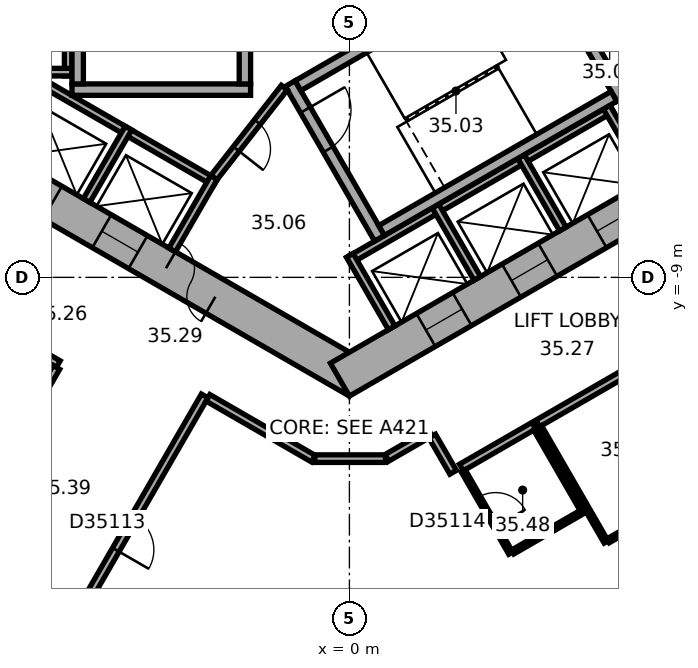
"""IFC4 building model, lengths in metres.
Left out: names, types, materials, properties, quantities, classifications, styles, units other than length and angle.
Written with IfcOpenShell. Run it as: python <this file> out.ifc"""

import sys

from ifc_helpers import new_model, si_unit, direction, frame, frame_2d, origin, place, context, subcontext, project, spatial, rectangle, extrude, element, fill, save


model = new_model("IFC4")
c1 = context("Model", 3, precision=1e-05, world=origin(), true_north=direction((0.0, 1.0)))
c2 = subcontext(c1, "Body", "Model", "MODEL_VIEW")
j1 = project(units=[si_unit("LENGTHUNIT", "METRE"), si_unit("PLANEANGLEUNIT", "RADIAN")], contexts=[c1])
p1 = place(None, origin())
s1 = spatial("IfcSite", under=j1, at=p1, CompositionType="ELEMENT")
p2 = place(p1, origin())
s2 = spatial("IfcBuilding", under=s1, at=p2, CompositionType="ELEMENT")
p3 = place(p2, frame((0.0, 0.0, 146.6)))
s3 = spatial("IfcBuildingStorey", under=s2, at=p3, CompositionType="ELEMENT", Elevation=146.6)
p4 = place(p3, frame((-10.25, -5.629, 0.0), z_axis=(0.0, 0.0, 1.0), x_axis=(0.866022616891, -0.50000482701, 0.0)))
e1 = element("IfcWall", 1, at=p4, inside=s3, PredefinedType="SHEAR", context=c2, shape_type="SweptSolid", body=[
    extrude(rectangle(XDim=12.125, YDim=1.0, at=frame_2d((6.062, 0.0))), origin(), (0.0, 0.0, 1.0), 3.7),
])
p5 = place(p4, frame((6.262, 0.0, 0.0)))
e2 = element("IfcOpeningElement", 2, at=p5, cuts=e1, PredefinedType="OPENING", context=c2, shape_type="SweptSolid", body=[
    extrude(rectangle(XDim=1.5, YDim=2.1, at=frame_2d((0.75, 1.05))), frame((0.0, 0.51, 0.0), z_axis=(0.0, -1.0, 0.0), x_axis=(1.0, 0.0, 0.0)), (0.0, 0.0, 1.0), 1.02),
])
p6 = place(p4, frame((1.712, 0.0, 0.0)))
e3 = element("IfcOpeningElement", 3, at=p6, cuts=e1, PredefinedType="OPENING", context=c2, shape_type="SweptSolid", body=[
    extrude(rectangle(XDim=1.1, YDim=2.1, at=frame_2d((0.55, 1.05))), frame((0.0, 0.51, 0.0), z_axis=(0.0, -1.0, 0.0), x_axis=(1.0, 0.0, 0.0)), (0.0, 0.0, 1.0), 1.02),
])
p7 = place(p4, frame((4.312, 0.0, 0.0)))
e4 = element("IfcOpeningElement", 4, at=p7, cuts=e1, PredefinedType="OPENING", context=c2, shape_type="SweptSolid", body=[
    extrude(rectangle(XDim=1.1, YDim=2.1, at=frame_2d((0.55, 1.05))), frame((0.0, 0.51, 0.0), z_axis=(0.0, -1.0, 0.0), x_axis=(1.0, 0.0, 0.0)), (0.0, 0.0, 1.0), 1.02),
])
p8 = place(p3, frame((-0.25, -11.691, 0.0), z_axis=(0.0, 0.0, 1.0), x_axis=(0.866022616891, 0.50000482701, 0.0)))
e5 = element("IfcWall", 5, at=p8, inside=s3, PredefinedType="SHEAR", context=c2, shape_type="SweptSolid", body=[
    extrude(rectangle(XDim=12.125, YDim=1.0, at=frame_2d((6.062, 0.0))), origin(), (0.0, 0.0, 1.0), 3.7),
])
p9 = place(p8, frame((2.612, 0.0, 0.0)))
e6 = element("IfcOpeningElement", 6, at=p9, cuts=e5, PredefinedType="OPENING", context=c2, shape_type="SweptSolid", body=[
    extrude(rectangle(XDim=1.1, YDim=2.1, at=frame_2d((0.55, 1.05))), frame((0.0, 0.51, 0.0), z_axis=(0.0, -1.0, 0.0), x_axis=(1.0, 0.0, 0.0)), (0.0, 0.0, 1.0), 1.02),
])
p10 = place(p8, frame((5.212, 0.0, 0.0)))
e7 = element("IfcOpeningElement", 7, at=p10, cuts=e5, PredefinedType="OPENING", context=c2, shape_type="SweptSolid", body=[
    extrude(rectangle(XDim=1.1, YDim=2.1, at=frame_2d((0.55, 1.05))), frame((0.0, 0.51, 0.0), z_axis=(0.0, -1.0, 0.0), x_axis=(1.0, 0.0, 0.0)), (0.0, 0.0, 1.0), 1.02),
])
p11 = place(p8, frame((7.812, 0.0, 0.0)))
e8 = element("IfcOpeningElement", 8, at=p11, cuts=e5, PredefinedType="OPENING", context=c2, shape_type="SweptSolid", body=[
    extrude(rectangle(XDim=1.1, YDim=2.1, at=frame_2d((0.55, 1.05))), frame((0.0, 0.51, 0.0), z_axis=(0.0, -1.0, 0.0), x_axis=(1.0, 0.0, 0.0)), (0.0, 0.0, 1.0), 1.02),
])
p12 = place(p3, frame((-18.789, -14.267, 0.0), z_axis=(0.0, 0.0, 1.0), x_axis=(0.866023315909, -0.500003616288, 0.0)))
e9 = element("IfcWall", 9, at=p12, inside=s3, PredefinedType="STANDARD", context=c2, shape_type="SweptSolid", body=[
    extrude(rectangle(XDim=20.044, YDim=0.2, at=frame_2d((10.022, 0.0))), origin(), (0.0, 0.0, 1.0), 3.7),
])
p13 = place(p12, frame((1.314, 0.0, 0.9)))
e10 = element("IfcOpeningElement", 10, at=p13, cuts=e9, PredefinedType="OPENING", context=c2, shape_type="SweptSolid", body=[
    extrude(rectangle(XDim=2.4, YDim=2.0, at=frame_2d((1.2, 1.0))), frame((0.0, 0.11, 0.0), z_axis=(0.0, -1.0, 0.0), x_axis=(1.0, 0.0, 0.0)), (0.0, 0.0, 1.0), 0.22),
])
p14 = place(p12, frame((5.069, 0.0, 0.9)))
e11 = element("IfcOpeningElement", 11, at=p14, cuts=e9, PredefinedType="OPENING", context=c2, shape_type="SweptSolid", body=[
    extrude(rectangle(XDim=2.4, YDim=2.0, at=frame_2d((1.2, 1.0))), frame((0.0, 0.11, 0.0), z_axis=(0.0, -1.0, 0.0), x_axis=(1.0, 0.0, 0.0)), (0.0, 0.0, 1.0), 0.22),
])
p15 = place(p12, frame((8.823, 0.0, 0.9)))
e12 = element("IfcOpeningElement", 12, at=p15, cuts=e9, PredefinedType="OPENING", context=c2, shape_type="SweptSolid", body=[
    extrude(rectangle(XDim=2.4, YDim=2.0, at=frame_2d((1.2, 1.0))), frame((0.0, 0.11, 0.0), z_axis=(0.0, -1.0, 0.0), x_axis=(1.0, 0.0, 0.0)), (0.0, 0.0, 1.0), 0.22),
])
p16 = place(p12, frame((12.577, 0.0, 0.9)))
e13 = element("IfcOpeningElement", 13, at=p16, cuts=e9, PredefinedType="OPENING", context=c2, shape_type="SweptSolid", body=[
    extrude(rectangle(XDim=2.4, YDim=2.0, at=frame_2d((1.2, 1.0))), frame((0.0, 0.11, 0.0), z_axis=(0.0, -1.0, 0.0), x_axis=(1.0, 0.0, 0.0)), (0.0, 0.0, 1.0), 0.22),
])
p17 = place(p12, frame((16.331, 0.0, 0.9)))
e14 = element("IfcOpeningElement", 14, at=p17, cuts=e9, PredefinedType="OPENING", context=c2, shape_type="SweptSolid", body=[
    extrude(rectangle(XDim=2.4, YDim=2.0, at=frame_2d((1.2, 1.0))), frame((0.0, 0.11, 0.0), z_axis=(0.0, -1.0, 0.0), x_axis=(1.0, 0.0, 0.0)), (0.0, 0.0, 1.0), 0.22),
])
p18 = place(p3, frame((2.911, -24.156, 0.0), z_axis=(0.0, 0.0, 1.0), x_axis=(0.833882163564, 0.551942512668, 0.0)))
e15 = element("IfcWall", 15, at=p18, inside=s3, PredefinedType="STANDARD", context=c2, shape_type="SweptSolid", body=[
    extrude(rectangle(XDim=20.044, YDim=0.2, at=frame_2d((10.022, 0.0))), origin(), (0.0, 0.0, 1.0), 3.7),
])
p19 = place(p18, frame((1.313, 0.0, 0.9)))
e16 = element("IfcOpeningElement", 16, at=p19, cuts=e15, PredefinedType="OPENING", context=c2, shape_type="SweptSolid", body=[
    extrude(rectangle(XDim=2.4, YDim=2.0, at=frame_2d((1.2, 1.0))), frame((0.0, 0.11, 0.0), z_axis=(0.0, -1.0, 0.0), x_axis=(1.0, 0.0, 0.0)), (0.0, 0.0, 1.0), 0.22),
])
p20 = place(p18, frame((5.067, 0.0, 0.9)))
e17 = element("IfcOpeningElement", 17, at=p20, cuts=e15, PredefinedType="OPENING", context=c2, shape_type="SweptSolid", body=[
    extrude(rectangle(XDim=2.4, YDim=2.0, at=frame_2d((1.2, 1.0))), frame((0.0, 0.11, 0.0), z_axis=(0.0, -1.0, 0.0), x_axis=(1.0, 0.0, 0.0)), (0.0, 0.0, 1.0), 0.22),
])
p21 = place(p18, frame((8.821, 0.0, 0.9)))
e18 = element("IfcOpeningElement", 18, at=p21, cuts=e15, PredefinedType="OPENING", context=c2, shape_type="SweptSolid", body=[
    extrude(rectangle(XDim=2.4, YDim=2.0, at=frame_2d((1.2, 1.0))), frame((0.0, 0.11, 0.0), z_axis=(0.0, -1.0, 0.0), x_axis=(1.0, 0.0, 0.0)), (0.0, 0.0, 1.0), 0.22),
])
p22 = place(p18, frame((12.575, 0.0, 0.9)))
e19 = element("IfcOpeningElement", 19, at=p22, cuts=e15, PredefinedType="OPENING", context=c2, shape_type="SweptSolid", body=[
    extrude(rectangle(XDim=2.4, YDim=2.0, at=frame_2d((1.2, 1.0))), frame((0.0, 0.11, 0.0), z_axis=(0.0, -1.0, 0.0), x_axis=(1.0, 0.0, 0.0)), (0.0, 0.0, 1.0), 0.22),
])
p23 = place(p18, frame((16.329, 0.0, 0.9)))
e20 = element("IfcOpeningElement", 20, at=p23, cuts=e15, PredefinedType="OPENING", context=c2, shape_type="SweptSolid", body=[
    extrude(rectangle(XDim=2.4, YDim=2.0, at=frame_2d((1.2, 1.0))), frame((0.0, 0.11, 0.0), z_axis=(0.0, -1.0, 0.0), x_axis=(1.0, 0.0, 0.0)), (0.0, 0.0, 1.0), 0.22),
])
p24 = place(p3, frame((-7.4, 4.3, 0.0), z_axis=(0.0, 0.0, 1.0), x_axis=(0.0, -1.0, 0.0)))
e21 = element("IfcWall", 21, at=p24, inside=s3, PredefinedType="PARTITIONING", context=c2, shape_type="SweptSolid", body=[
    extrude(rectangle(XDim=8.0, YDim=0.2, at=frame_2d((4.0, 0.0))), origin(), (0.0, 0.0, 1.0), 3.42),
])
p25 = place(p3, frame((-7.3, -3.6, 0.0), z_axis=(0.0, 0.0, 1.0), x_axis=(-1.0, 0.0, 0.0)))
e22 = element("IfcWall", 22, at=p25, inside=s3, PredefinedType="PARTITIONING", context=c2, shape_type="SweptSolid", body=[
    extrude(rectangle(XDim=2.2, YDim=0.2, at=frame_2d((1.1, 0.0))), origin(), (0.0, 0.0, 1.0), 3.42),
])
p26 = place(p3, frame((-8.203, -3.809, 0.0), z_axis=(0.0, 0.0, 1.0), x_axis=(0.866028230842, -0.499995103361, 0.0)))
e23 = element("IfcWall", 23, at=p26, inside=s3, PredefinedType="PARTITIONING", context=c2, shape_type="SweptSolid", body=[
    extrude(rectangle(XDim=5.4, YDim=0.2, at=frame_2d((2.7, 0.0))), origin(), (0.0, 0.0, 1.0), 3.42),
])
p27 = place(p3, frame((-5.815, -5.072, 0.0), z_axis=(0.0, 0.0, 1.0), x_axis=(-0.499946605688, -0.86605622881, 0.0)))
e24 = element("IfcWall", 24, at=p27, inside=s3, PredefinedType="PARTITIONING", context=c2, shape_type="SweptSolid", body=[
    extrude(rectangle(XDim=2.2, YDim=0.2, at=frame_2d((1.1, 0.0))), origin(), (0.0, 0.0, 1.0), 3.42),
])
p28 = place(p3, frame((-3.563, -6.372, 0.0), z_axis=(0.0, 0.0, 1.0), x_axis=(-0.499994660107, -0.866028486751, 0.0)))
e25 = element("IfcWall", 25, at=p28, inside=s3, PredefinedType="PARTITIONING", context=c2, shape_type="SweptSolid", body=[
    extrude(rectangle(XDim=2.2, YDim=0.2, at=frame_2d((1.1, 0.0))), origin(), (0.0, 0.0, 1.0), 3.42),
])
p29 = place(p3, frame((-0.024, -8.559, 0.0), z_axis=(0.0, 0.0, 1.0), x_axis=(0.866026010844, 0.49999894854, 0.0)))
e26 = element("IfcWall", 26, at=p29, inside=s3, PredefinedType="PARTITIONING", context=c2, shape_type="SweptSolid", body=[
    extrude(rectangle(XDim=8.0, YDim=0.2, at=frame_2d((4.0, 0.0))), origin(), (0.0, 0.0, 1.0), 3.42),
])
for number, where, z_axis, x_axis in (
    (27, (0.013, -8.422, 0.0), (0.0, 0.0, 1.0), (0.5, -0.866, 0.0)),
    (28, (2.264, -7.122, 0.0), (0.0, 0.0, 1.0), (0.5, -0.866, 0.0)),
    (29, (4.516, -5.822, 0.0), (0.0, 0.0, 1.0), (0.5, -0.866, 0.0)),
    (30, (6.768, -4.522, 0.0), (0.0, 0.0, 1.0), (0.5, -0.866, 0.0)),
):
    element("IfcWall", number, at=place(p3, frame(where, z_axis=z_axis, x_axis=x_axis)), inside=s3, PredefinedType="PARTITIONING", context=c2, shape_type="SweptSolid", body=[
        extrude(rectangle(XDim=2.2, YDim=0.2, at=frame_2d((1.1, 0.0))), origin(), (0.0, 0.0, 1.0), 3.42),
    ])
p30 = place(p3, frame((-2.6, -4.06, 0.0), z_axis=(0.0, 0.0, 1.0), x_axis=(-1.0, 0.0, 0.0)))
e31 = element("IfcWall", 31, at=p30, inside=s3, PredefinedType="SHEAR", context=c2, shape_type="SweptSolid", body=[
    extrude(rectangle(XDim=4.7, YDim=0.3, at=frame_2d((2.35, 0.0))), origin(), (0.0, 0.0, 1.0), 3.42),
])
for number, where, z_axis, x_axis in (
    (32, (-2.75, 3.15, 0.0), (0.0, 0.0, 1.0), (0.0, -1.0, 0.0)),
    (33, (-7.15, 3.15, 0.0), (0.0, 0.0, 1.0), (0.0, -1.0, 0.0)),
):
    element("IfcWall", number, at=place(p3, frame(where, z_axis=z_axis, x_axis=x_axis)), inside=s3, PredefinedType="SHEAR", context=c2, shape_type="SweptSolid", body=[
        extrude(rectangle(XDim=7.06, YDim=0.3, at=frame_2d((3.53, 0.0))), origin(), (0.0, 0.0, 1.0), 3.42),
    ])
p31 = place(p3, frame((-1.558, -3.902, 0.0), z_axis=(0.0, 0.0, 1.0), x_axis=(0.499977259774, -0.866038532462, 0.0)))
e34 = element("IfcWall", 34, at=p31, inside=s3, PredefinedType="SHEAR", context=c2, shape_type="SweptSolid", body=[
    extrude(rectangle(XDim=4.7, YDim=0.3, at=frame_2d((2.35, 0.0))), origin(), (0.0, 0.0, 1.0), 3.42),
])
p32 = place(p31, frame((0.8, 0.0, 0.0)))
e35 = element("IfcOpeningElement", 35, at=p32, cuts=e34, PredefinedType="OPENING", context=c2, shape_type="SweptSolid", body=[
    extrude(rectangle(XDim=1.2, YDim=2.1, at=frame_2d((0.6, 1.05))), frame((0.0, 0.16, 0.0), z_axis=(0.0, -1.0, 0.0), x_axis=(1.0, 0.0, 0.0)), (0.0, 0.0, 1.0), 0.32),
])
p33 = place(p3, frame((4.816, -0.222, 0.0), z_axis=(0.0, 0.0, 1.0), x_axis=(0.499977259774, -0.866038532462, 0.0)))
e36 = element("IfcWall", 36, at=p33, inside=s3, PredefinedType="SHEAR", context=c2, shape_type="SweptSolid", body=[
    extrude(rectangle(XDim=4.7, YDim=0.3, at=frame_2d((2.35, 0.0))), origin(), (0.0, 0.0, 1.0), 3.42),
])
for number, where, z_axis, x_axis in (
    (37, (-1.353, -3.957, 0.0), (0.0, 0.0, 1.0), (0.866, 0.5, 0.0)),
    (38, (0.847, -7.767, 0.0), (0.0, 0.0, 1.0), (0.866, 0.5, 0.0)),
):
    element("IfcWall", number, at=place(p3, frame(where, z_axis=z_axis, x_axis=x_axis)), inside=s3, PredefinedType="SHEAR", context=c2, shape_type="SweptSolid", body=[
        extrude(rectangle(XDim=7.06, YDim=0.3, at=frame_2d((3.53, 0.0))), origin(), (0.0, 0.0, 1.0), 3.42),
    ])
p34 = place(p3, frame((-1.712, -4.008, 0.0), z_axis=(0.0, 0.0, 1.0), x_axis=(-0.616549420702, -0.787316208287, 0.0)))
e39 = element("IfcWall", 39, at=p34, inside=s3, PredefinedType="PARTITIONING", context=c2, shape_type="SweptSolid", body=[
    extrude(rectangle(XDim=3.002, YDim=0.2, at=frame_2d((1.501, 0.0))), origin(), (0.0, 0.0, 1.0), 3.42),
])
p35 = place(p34, frame((1.15, 0.0, 0.0)))
e40 = element("IfcOpeningElement", 40, at=p35, cuts=e39, PredefinedType="OPENING", context=c2, shape_type="SweptSolid", body=[
    extrude(rectangle(XDim=0.9, YDim=2.1, at=frame_2d((0.45, 1.05))), frame((0.0, 0.11, 0.0), z_axis=(0.0, -1.0, 0.0), x_axis=(1.0, 0.0, 0.0)), (0.0, 0.0, 1.0), 0.22),
])
p36 = place(p3, frame((-11.435, -9.103, 0.0), z_axis=(0.0, 0.0, 1.0), x_axis=(0.866007399799, -0.500031182522, 0.0)))
e41 = element("IfcWall", 41, at=p36, inside=s3, PredefinedType="PARTITIONING", context=c2, shape_type="SweptSolid", body=[
    extrude(rectangle(XDim=4.358, YDim=0.2, at=frame_2d((2.179, 0.0))), origin(), (0.0, 0.0, 1.0), 3.42),
])
p37 = place(p3, frame((-11.235, -17.474, 0.0), z_axis=(0.0, 0.0, 1.0), x_axis=(0.500009260695, 0.866020057054, 0.0)))
e42 = element("IfcWall", 42, at=p37, inside=s3, PredefinedType="PARTITIONING", context=c2, shape_type="SweptSolid", body=[
    extrude(rectangle(XDim=7.049, YDim=0.2, at=frame_2d((3.524, 0.0))), origin(), (0.0, 0.0, 1.0), 2.87),
])
p38 = place(p37, frame((3.024, 0.0, 0.0)))
e43 = element("IfcOpeningElement", 43, at=p38, cuts=e42, PredefinedType="OPENING", context=c2, shape_type="SweptSolid", body=[
    extrude(rectangle(XDim=1.0, YDim=2.1, at=frame_2d((0.5, 1.05))), frame((0.0, 0.11, 0.0), z_axis=(0.0, -1.0, 0.0), x_axis=(1.0, 0.0, 0.0)), (0.0, 0.0, 1.0), 0.22),
])
p39 = place(p3, frame((-7.984, -19.351, 0.0), z_axis=(0.0, 0.0, 1.0), x_axis=(0.500010139422, 0.866019549707, 0.0)))
e44 = element("IfcWall", 44, at=p39, inside=s3, PredefinedType="PARTITIONING", context=c2, shape_type="SweptSolid", body=[
    extrude(rectangle(XDim=8.35, YDim=0.2, at=frame_2d((4.175, 0.0))), origin(), (0.0, 0.0, 1.0), 3.42),
])
p40 = place(p39, frame((3.675, 0.0, 0.0)))
e45 = element("IfcOpeningElement", 45, at=p40, cuts=e44, PredefinedType="OPENING", context=c2, shape_type="SweptSolid", body=[
    extrude(rectangle(XDim=1.0, YDim=2.1, at=frame_2d((0.5, 1.05))), frame((0.0, 0.11, 0.0), z_axis=(0.0, -1.0, 0.0), x_axis=(1.0, 0.0, 0.0)), (0.0, 0.0, 1.0), 0.22),
])
p41 = place(p3, frame((-3.722, -12.169, 0.0), z_axis=(0.0, 0.0, 1.0), x_axis=(0.866033163891, -0.499986558861, 0.0)))
e46 = element("IfcWall", 46, at=p41, inside=s3, PredefinedType="PARTITIONING", context=c2, shape_type="SweptSolid", body=[
    extrude(rectangle(XDim=3.201, YDim=0.2, at=frame_2d((1.6, 0.0))), origin(), (0.0, 0.0, 1.0), 3.42),
])
p42 = place(p3, frame((-0.91, -13.77, 0.0), z_axis=(0.0, 0.0, 1.0), x_axis=(1.0, 0.0, 0.0)))
e47 = element("IfcWall", 47, at=p42, inside=s3, PredefinedType="PARTITIONING", context=c2, shape_type="SweptSolid", body=[
    extrude(rectangle(XDim=1.86, YDim=0.2, at=frame_2d((0.93, 0.0))), origin(), (0.0, 0.0, 1.0), 3.42),
])
p43 = place(p3, frame((0.985, -13.75, 0.0), z_axis=(0.0, 0.0, 1.0), x_axis=(0.866028661061, 0.499994358189, 0.0)))
e48 = element("IfcWall", 48, at=p43, inside=s3, PredefinedType="PARTITIONING", context=c2, shape_type="SweptSolid", body=[
    extrude(rectangle(XDim=1.321, YDim=0.2, at=frame_2d((0.661, 0.0))), origin(), (0.0, 0.0, 1.0), 3.42),
])
p44 = place(p3, frame((2.179, -13.176, 0.0), z_axis=(0.0, 0.0, 1.0), x_axis=(0.499978356969, -0.866037899034, 0.0)))
e49 = element("IfcWall", 49, at=p44, inside=s3, PredefinedType="PARTITIONING", context=c2, shape_type="SweptSolid", body=[
    extrude(rectangle(XDim=1.101, YDim=0.2, at=frame_2d((0.551, 0.0))), origin(), (0.0, 0.0, 1.0), 3.42),
])
p45 = place(p3, frame((2.946, -14.004, 0.0), z_axis=(0.0, 0.0, 1.0), x_axis=(0.866008176907, 0.50002983664, 0.0)))
e50 = element("IfcWall", 50, at=p45, inside=s3, PredefinedType="PARTITIONING", context=c2, shape_type="SweptSolid", body=[
    extrude(rectangle(XDim=2.2, YDim=0.2, at=frame_2d((1.1, 0.0))), origin(), (0.0, 0.0, 1.0), 3.42),
])
p46 = place(p3, frame((4.246, -16.256, 0.0), z_axis=(0.0, 0.0, 1.0), x_axis=(-0.499961950354, 0.866047370643, 0.0)))
e51 = element("IfcWall", 51, at=p46, inside=s3, PredefinedType="PARTITIONING", context=c2, shape_type="SweptSolid", body=[
    extrude(rectangle(XDim=2.5, YDim=0.12, at=frame_2d((1.25, 0.0))), origin(), (0.0, 0.0, 1.0), 3.42),
])
p47 = place(p46, frame((0.8, 0.0, 0.0)))
e52 = element("IfcOpeningElement", 52, at=p47, cuts=e51, PredefinedType="OPENING", context=c2, shape_type="SweptSolid", body=[
    extrude(rectangle(XDim=0.9, YDim=2.1, at=frame_2d((0.45, 1.05))), frame((0.0, 0.07, 0.0), z_axis=(0.0, -1.0, 0.0), x_axis=(1.0, 0.0, 0.0)), (0.0, 0.0, 1.0), 0.14),
])
p48 = place(p3, frame((4.901, -12.991, 0.0), z_axis=(0.0, 0.0, 1.0), x_axis=(0.500004234368, -0.866022959057, 0.0)))
e53 = element("IfcWall", 53, at=p48, inside=s3, PredefinedType="PARTITIONING", context=c2, shape_type="SweptSolid", body=[
    extrude(rectangle(XDim=2.5, YDim=0.12, at=frame_2d((1.25, 0.0))), origin(), (0.0, 0.0, 1.0), 3.42),
])
p49 = place(p3, frame((4.955, -12.844, 0.0), z_axis=(0.0, 0.0, 1.0), x_axis=(0.86602379309, 0.500002789795, 0.0)))
e54 = element("IfcWall", 54, at=p49, inside=s3, PredefinedType="PARTITIONING", context=c2, shape_type="SweptSolid", body=[
    extrude(rectangle(XDim=6.232, YDim=0.2, at=frame_2d((3.116, 0.0))), origin(), (0.0, 0.0, 1.0), 3.42),
])
p50 = place(p3, frame((6.099, -15.186, 0.0), z_axis=(0.0, 0.0, 1.0), x_axis=(-0.866009661879, -0.500027264788, 0.0)))
e55 = element("IfcWall", 55, at=p50, inside=s3, PredefinedType="PARTITIONING", context=c2, shape_type="SweptSolid", body=[
    extrude(rectangle(XDim=2.08, YDim=0.12, at=frame_2d((1.04, 0.0))), origin(), (0.0, 0.0, 1.0), 3.42),
])
p51 = place(p3, frame((6.755, -15.962, 0.0), z_axis=(0.0, 0.0, 1.0), x_axis=(-0.500010275428, 0.866019471182, 0.0)))
e56 = element("IfcWall", 56, at=p51, inside=s3, PredefinedType="PARTITIONING", context=c2, shape_type="SweptSolid", body=[
    extrude(rectangle(XDim=3.5, YDim=0.12, at=frame_2d((1.75, 0.0))), origin(), (0.0, 0.0, 1.0), 3.42),
])
p52 = place(p3, frame((9.647, -14.292, 0.0), z_axis=(0.0, 0.0, 1.0), x_axis=(-0.866040564224, -0.499973740429, 0.0)))
e57 = element("IfcWall", 57, at=p52, inside=s3, PredefinedType="PARTITIONING", context=c2, shape_type="SweptSolid", body=[
    extrude(rectangle(XDim=3.28, YDim=0.12, at=frame_2d((1.64, 0.0))), origin(), (0.0, 0.0, 1.0), 3.42),
])
p53 = place(p52, frame((1.19, 0.0, 0.0)))
e58 = element("IfcOpeningElement", 58, at=p53, cuts=e57, PredefinedType="OPENING", context=c2, shape_type="SweptSolid", body=[
    extrude(rectangle(XDim=0.9, YDim=2.1, at=frame_2d((0.45, 1.05))), frame((0.0, 0.07, 0.0), z_axis=(0.0, -1.0, 0.0), x_axis=(1.0, 0.0, 0.0)), (0.0, 0.0, 1.0), 0.14),
])
p54 = place(p5, origin())
e59 = element("IfcDoor", 59, at=p54, inside=s3, OperationType="DOUBLE_DOOR_SINGLE_SWING", PredefinedType="DOOR", context=c2, shape_type="SweptSolid", body=[
    extrude(rectangle(XDim=1.5, YDim=2.1, at=frame_2d((0.75, 1.05))), frame((0.0, 0.025, 0.0), z_axis=(0.0, -1.0, 0.0), x_axis=(1.0, 0.0, 0.0)), (0.0, 0.0, 1.0), 0.05),
])
fill(e2, e59)
p55 = place(p32, origin())
e60 = element("IfcDoor", 60, at=p55, inside=s3, OperationType="SINGLE_SWING_RIGHT", PredefinedType="DOOR", context=c2, shape_type="SweptSolid", body=[
    extrude(rectangle(XDim=1.2, YDim=2.1, at=frame_2d((0.6, 1.05))), frame((0.0, 0.025, 0.0), z_axis=(0.0, -1.0, 0.0), x_axis=(1.0, 0.0, 0.0)), (0.0, 0.0, 1.0), 0.05),
])
fill(e35, e60)
p56 = place(p35, origin())
e61 = element("IfcDoor", 61, at=p56, inside=s3, OperationType="SINGLE_SWING_LEFT", PredefinedType="DOOR", context=c2, shape_type="SweptSolid", body=[
    extrude(rectangle(XDim=0.9, YDim=2.1, at=frame_2d((0.45, 1.05))), frame((0.0, 0.025, 0.0), z_axis=(0.0, -1.0, 0.0), x_axis=(1.0, 0.0, 0.0)), (0.0, 0.0, 1.0), 0.05),
])
fill(e40, e61)
p57 = place(p6, origin())
e62 = element("IfcDoor", 62, at=p57, inside=s3, OperationType="DOUBLE_DOOR_SLIDING", PredefinedType="DOOR", context=c2, shape_type="SweptSolid", body=[
    extrude(rectangle(XDim=1.1, YDim=2.1, at=frame_2d((0.55, 1.05))), frame((0.0, 0.025, 0.0), z_axis=(0.0, -1.0, 0.0), x_axis=(1.0, 0.0, 0.0)), (0.0, 0.0, 1.0), 0.05),
])
fill(e3, e62)
p58 = place(p7, origin())
e63 = element("IfcDoor", 63, at=p58, inside=s3, OperationType="DOUBLE_DOOR_SLIDING", PredefinedType="DOOR", context=c2, shape_type="SweptSolid", body=[
    extrude(rectangle(XDim=1.1, YDim=2.1, at=frame_2d((0.55, 1.05))), frame((0.0, 0.025, 0.0), z_axis=(0.0, -1.0, 0.0), x_axis=(1.0, 0.0, 0.0)), (0.0, 0.0, 1.0), 0.05),
])
fill(e4, e63)
p59 = place(p9, origin())
e64 = element("IfcDoor", 64, at=p59, inside=s3, OperationType="DOUBLE_DOOR_SLIDING", PredefinedType="DOOR", context=c2, shape_type="SweptSolid", body=[
    extrude(rectangle(XDim=1.1, YDim=2.1, at=frame_2d((0.55, 1.05))), frame((0.0, 0.025, 0.0), z_axis=(0.0, -1.0, 0.0), x_axis=(1.0, 0.0, 0.0)), (0.0, 0.0, 1.0), 0.05),
])
fill(e6, e64)
p60 = place(p10, origin())
e65 = element("IfcDoor", 65, at=p60, inside=s3, OperationType="DOUBLE_DOOR_SLIDING", PredefinedType="DOOR", context=c2, shape_type="SweptSolid", body=[
    extrude(rectangle(XDim=1.1, YDim=2.1, at=frame_2d((0.55, 1.05))), frame((0.0, 0.025, 0.0), z_axis=(0.0, -1.0, 0.0), x_axis=(1.0, 0.0, 0.0)), (0.0, 0.0, 1.0), 0.05),
])
fill(e7, e65)
p61 = place(p11, origin())
e66 = element("IfcDoor", 66, at=p61, inside=s3, OperationType="DOUBLE_DOOR_SLIDING", PredefinedType="DOOR", context=c2, shape_type="SweptSolid", body=[
    extrude(rectangle(XDim=1.1, YDim=2.1, at=frame_2d((0.55, 1.05))), frame((0.0, 0.025, 0.0), z_axis=(0.0, -1.0, 0.0), x_axis=(1.0, 0.0, 0.0)), (0.0, 0.0, 1.0), 0.05),
])
fill(e8, e66)
p62 = place(p40, origin())
e67 = element("IfcDoor", 67, at=p62, inside=s3, OperationType="SINGLE_SWING_LEFT", PredefinedType="DOOR", context=c2, shape_type="SweptSolid", body=[
    extrude(rectangle(XDim=1.0, YDim=2.1, at=frame_2d((0.5, 1.05))), frame((0.0, 0.025, 0.0), z_axis=(0.0, -1.0, 0.0), x_axis=(1.0, 0.0, 0.0)), (0.0, 0.0, 1.0), 0.05),
])
fill(e45, e67)
p63 = place(p47, origin())
e68 = element("IfcDoor", 68, at=p63, inside=s3, OperationType="SINGLE_SWING_LEFT", PredefinedType="DOOR", context=c2, shape_type="SweptSolid", body=[
    extrude(rectangle(XDim=0.9, YDim=2.1, at=frame_2d((0.45, 1.05))), frame((0.0, 0.025, 0.0), z_axis=(0.0, -1.0, 0.0), x_axis=(1.0, 0.0, 0.0)), (0.0, 0.0, 1.0), 0.05),
])
fill(e52, e68)
save(model, sys.argv[1])
